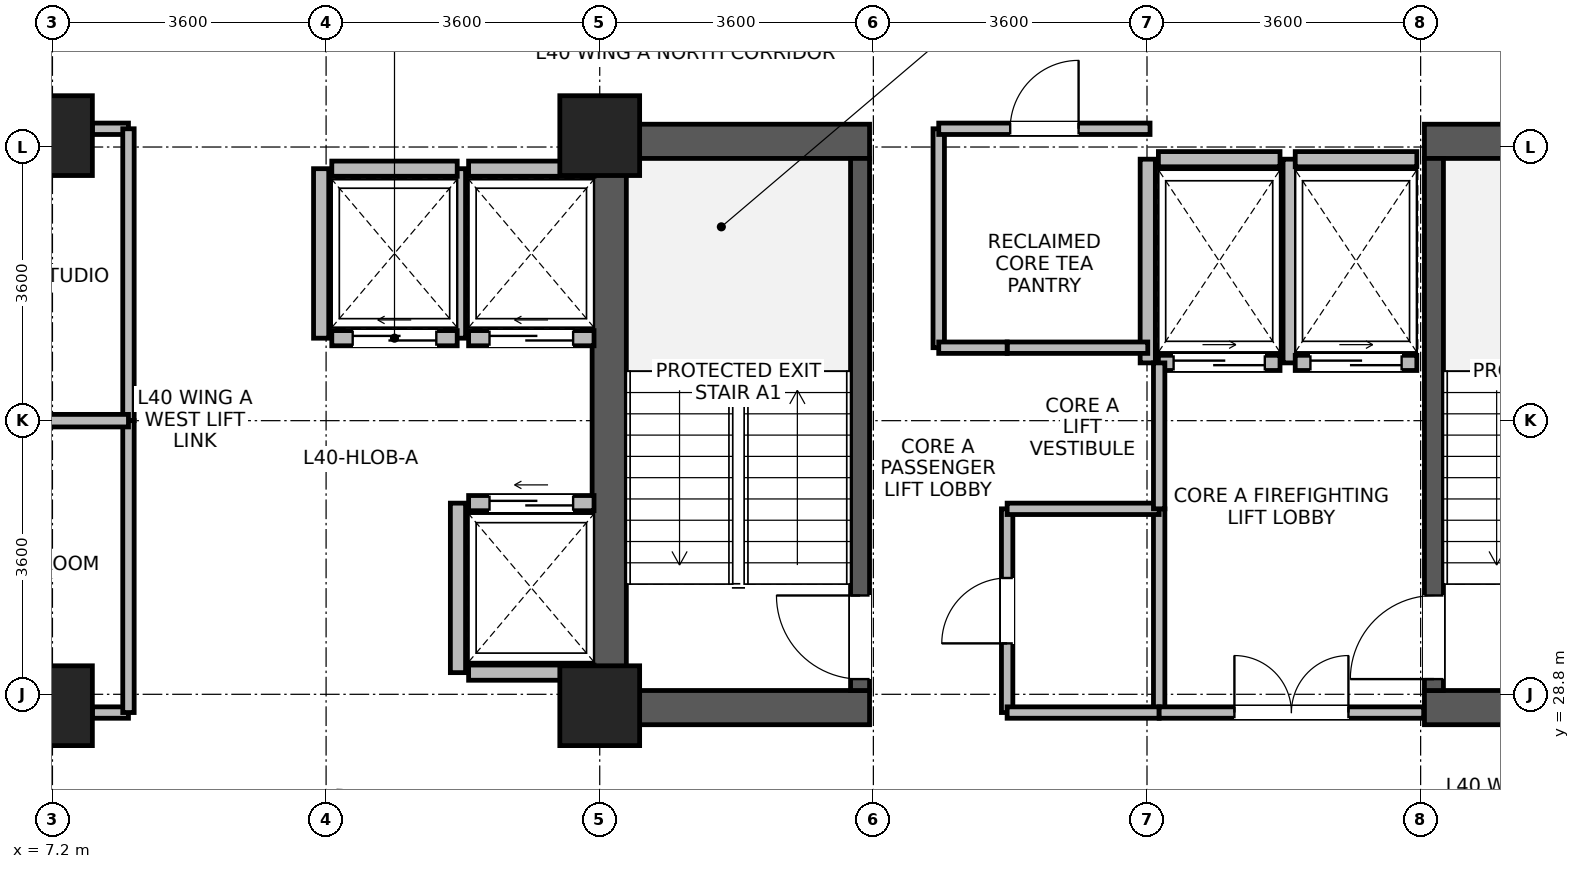
"""IFC4 building model, lengths in metres.
Left out: names, types, materials, properties, quantities, classifications, styles, units other than length and angle.
Written with IfcOpenShell. Run it as: python <this file> out.ifc"""

import sys

from ifc_helpers import new_model, si_unit, direction, frame, frame_2d, origin, origin_2d, place, context, subcontext, project, spatial, rectangle, extrude, source, transform, mapped, element, fill, save


model = new_model("IFC4")
c1 = context("Model", 3, precision=1e-05, world=origin(), true_north=direction((0.0, 1.0)))
c2 = subcontext(c1, "Body", "Model", "MODEL_VIEW")
j1 = project(units=[si_unit("LENGTHUNIT", "METRE"), si_unit("PLANEANGLEUNIT", "RADIAN")], contexts=[c1])
p1 = place(None, origin())
s1 = spatial("IfcSite", under=j1, at=p1, CompositionType="ELEMENT")
p2 = place(p1, origin())
s2 = spatial("IfcBuilding", under=s1, at=p2, CompositionType="ELEMENT")
p3 = place(p2, frame((0.0, 0.0, 158.7)))
s3 = spatial("IfcBuildingStorey", under=s2, at=p3, CompositionType="ELEMENT", Elevation=158.7)
p4 = place(p3, frame((14.525, 28.4, 0.0), z_axis=(0.0, 0.0, 1.0), x_axis=(0.0, 1.0, 0.0)))
e1 = element("IfcWall", 1, at=p4, inside=s3, PredefinedType="SHEAR", context=c2, shape_type="SweptSolid", body=[
    extrude(rectangle(XDim=7.9, YDim=0.45, at=frame_2d((3.95, 0.0))), origin(), (0.0, 0.0, 1.0), 3.46),
])
for number, where, z_axis, x_axis in (
    (2, (14.75, 28.625, 0.0), (0.0, 0.0, 1.0), (1.0, 0.0, 0.0)),
    (3, (25.25, 28.625, 0.0), (0.0, 0.0, 1.0), (1.0, 0.0, 0.0)),
    (4, (14.75, 36.075, 0.0), (0.0, 0.0, 1.0), (1.0, 0.0, 0.0)),
    (5, (25.25, 36.075, 0.0), (0.0, 0.0, 1.0), (1.0, 0.0, 0.0)),
):
    element("IfcWall", number, at=place(p3, frame(where, z_axis=z_axis, x_axis=x_axis)), inside=s3, PredefinedType="SHEAR", context=c2, shape_type="SweptSolid", body=[
        extrude(rectangle(XDim=3.2, YDim=0.45, at=frame_2d((1.6, 0.0))), origin(), (0.0, 0.0, 1.0), 3.46),
    ])
p5 = place(p3, frame((17.825, 28.85, 0.0), z_axis=(0.0, 0.0, 1.0), x_axis=(0.0, 1.0, 0.0)))
e6 = element("IfcWall", 6, at=p5, inside=s3, PredefinedType="SHEAR", context=c2, shape_type="SweptSolid", body=[
    extrude(rectangle(XDim=7.0, YDim=0.25, at=frame_2d((3.5, 0.0))), origin(), (0.0, 0.0, 1.0), 3.46),
])
p6 = place(p5, frame((0.15, 0.0, 0.0)))
e7 = element("IfcOpeningElement", 7, at=p6, cuts=e6, PredefinedType="OPENING", context=c2, shape_type="SweptSolid", body=[
    extrude(rectangle(XDim=1.1, YDim=2.08, at=frame_2d((0.55, 1.04))), frame((0.0, 0.135, 0.0), z_axis=(0.0, -1.0, 0.0), x_axis=(1.0, 0.0, 0.0)), (0.0, 0.0, 1.0), 0.27),
])
p7 = place(p3, frame((25.375, 28.85, 0.0), z_axis=(0.0, 0.0, 1.0), x_axis=(0.0, 1.0, 0.0)))
e8 = element("IfcWall", 8, at=p7, inside=s3, PredefinedType="SHEAR", context=c2, shape_type="SweptSolid", body=[
    extrude(rectangle(XDim=7.0, YDim=0.25, at=frame_2d((3.5, 0.0))), origin(), (0.0, 0.0, 1.0), 3.46),
])
p8 = place(p7, frame((0.15, 0.0, 0.0)))
e9 = element("IfcOpeningElement", 9, at=p8, cuts=e8, PredefinedType="OPENING", context=c2, shape_type="SweptSolid", body=[
    extrude(rectangle(XDim=1.1, YDim=2.08, at=frame_2d((0.55, 1.04))), frame((0.0, 0.135, 0.0), z_axis=(0.0, -1.0, 0.0), x_axis=(1.0, 0.0, 0.0)), (0.0, 0.0, 1.0), 0.27),
])
m1 = source(origin(), c2, "Body", "SweptSolid", [
    extrude(rectangle(XDim=1.05, YDim=1.05, at=origin_2d()), origin(), (0.0, 0.0, 1.0), 3.7),
])
for number, where, z_axis, x_axis in (
    (10, (7.2, 28.65, 0.0), (0.0, 0.0, 1.0), (1.0, 0.0, 0.0)),
    (11, (7.2, 36.15, 0.0), (0.0, 0.0, 1.0), (1.0, 0.0, 0.0)),
    (12, (14.4, 28.65, 0.0), (0.0, 0.0, 1.0), (1.0, 0.0, 0.0)),
    (13, (14.4, 36.15, 0.0), (0.0, 0.0, 1.0), (1.0, 0.0, 0.0)),
):
    element("IfcColumn", number, at=place(p3, frame(where, z_axis=z_axis, x_axis=x_axis)), inside=s3, PredefinedType="COLUMN", context=c2, shape_type="MappedRepresentation", body=[
        mapped(m1, transform((0.0, 0.0, 0.0), x_axis=(1.0, 0.0, 0.0), y_axis=(0.0, 1.0, 0.0), z_axis=(0.0, 0.0, 1.0), scale=1.0)),
    ])
p9 = place(p3, frame((12.675, 33.485, 0.0), z_axis=(0.0, 0.0, 1.0), x_axis=(1.0, 0.0, 0.0)))
e14 = element("IfcWall", 14, at=p9, inside=s3, PredefinedType="PARTITIONING", context=c2, shape_type="SweptSolid", body=[
    extrude(rectangle(XDim=1.65, YDim=0.2, at=frame_2d((0.825, 0.0))), origin(), (0.0, 0.0, 1.0), 3.44),
])
p10 = place(p9, frame((0.275, 0.0, 0.0)))
e15 = element("IfcOpeningElement", 15, at=p10, cuts=e14, PredefinedType="OPENING", context=c2, shape_type="SweptSolid", body=[
    extrude(rectangle(XDim=1.1, YDim=2.12, at=frame_2d((0.55, 1.06))), frame((0.0, 0.11, 0.0), z_axis=(0.0, -1.0, 0.0), x_axis=(1.0, 0.0, 0.0)), (0.0, 0.0, 1.0), 0.22),
])
p11 = place(p3, frame((12.675, 35.715, 0.0), z_axis=(0.0, 0.0, 1.0), x_axis=(1.0, 0.0, 0.0)))
e16 = element("IfcWall", 16, at=p11, inside=s3, PredefinedType="PARTITIONING", context=c2, shape_type="SweptSolid", body=[
    extrude(rectangle(XDim=1.65, YDim=0.2, at=frame_2d((0.825, 0.0))), origin(), (0.0, 0.0, 1.0), 3.44),
])
p12 = place(p3, frame((12.535, 33.485, 0.0), z_axis=(0.0, 0.0, 1.0), x_axis=(0.0, 1.0, 0.0)))
e17 = element("IfcWall", 17, at=p12, inside=s3, PredefinedType="PARTITIONING", context=c2, shape_type="SweptSolid", body=[
    extrude(rectangle(XDim=2.23, YDim=0.2, at=frame_2d((1.115, 0.0))), origin(), (0.0, 0.0, 1.0), 3.44),
])
p13 = place(p3, frame((12.675, 29.085, 0.0), z_axis=(0.0, 0.0, 1.0), x_axis=(1.0, 0.0, 0.0)))
e18 = element("IfcWall", 18, at=p13, inside=s3, PredefinedType="PARTITIONING", context=c2, shape_type="SweptSolid", body=[
    extrude(rectangle(XDim=1.65, YDim=0.2, at=frame_2d((0.825, 0.0))), origin(), (0.0, 0.0, 1.0), 3.44),
])
p14 = place(p3, frame((12.675, 31.315, 0.0), z_axis=(0.0, 0.0, 1.0), x_axis=(1.0, 0.0, 0.0)))
e19 = element("IfcWall", 19, at=p14, inside=s3, PredefinedType="PARTITIONING", context=c2, shape_type="SweptSolid", body=[
    extrude(rectangle(XDim=1.65, YDim=0.2, at=frame_2d((0.825, 0.0))), origin(), (0.0, 0.0, 1.0), 3.44),
])
p15 = place(p14, frame((0.275, 0.0, 0.0)))
e20 = element("IfcOpeningElement", 20, at=p15, cuts=e19, PredefinedType="OPENING", context=c2, shape_type="SweptSolid", body=[
    extrude(rectangle(XDim=1.1, YDim=2.12, at=frame_2d((0.55, 1.06))), frame((0.0, 0.11, 0.0), z_axis=(0.0, -1.0, 0.0), x_axis=(1.0, 0.0, 0.0)), (0.0, 0.0, 1.0), 0.22),
])
p16 = place(p3, frame((12.535, 29.085, 0.0), z_axis=(0.0, 0.0, 1.0), x_axis=(0.0, 1.0, 0.0)))
e21 = element("IfcWall", 21, at=p16, inside=s3, PredefinedType="PARTITIONING", context=c2, shape_type="SweptSolid", body=[
    extrude(rectangle(XDim=2.23, YDim=0.2, at=frame_2d((1.115, 0.0))), origin(), (0.0, 0.0, 1.0), 3.44),
])
p17 = place(p3, frame((10.875, 33.485, 0.0), z_axis=(0.0, 0.0, 1.0), x_axis=(1.0, 0.0, 0.0)))
e22 = element("IfcWall", 22, at=p17, inside=s3, PredefinedType="PARTITIONING", context=c2, shape_type="SweptSolid", body=[
    extrude(rectangle(XDim=1.65, YDim=0.2, at=frame_2d((0.825, 0.0))), origin(), (0.0, 0.0, 1.0), 3.44),
])
p18 = place(p17, frame((0.275, 0.0, 0.0)))
e23 = element("IfcOpeningElement", 23, at=p18, cuts=e22, PredefinedType="OPENING", context=c2, shape_type="SweptSolid", body=[
    extrude(rectangle(XDim=1.1, YDim=2.12, at=frame_2d((0.55, 1.06))), frame((0.0, 0.11, 0.0), z_axis=(0.0, -1.0, 0.0), x_axis=(1.0, 0.0, 0.0)), (0.0, 0.0, 1.0), 0.22),
])
p19 = place(p3, frame((10.875, 35.715, 0.0), z_axis=(0.0, 0.0, 1.0), x_axis=(1.0, 0.0, 0.0)))
e24 = element("IfcWall", 24, at=p19, inside=s3, PredefinedType="PARTITIONING", context=c2, shape_type="SweptSolid", body=[
    extrude(rectangle(XDim=1.65, YDim=0.2, at=frame_2d((0.825, 0.0))), origin(), (0.0, 0.0, 1.0), 3.44),
])
p20 = place(p3, frame((10.735, 33.485, 0.0), z_axis=(0.0, 0.0, 1.0), x_axis=(0.0, 1.0, 0.0)))
e25 = element("IfcWall", 25, at=p20, inside=s3, PredefinedType="PARTITIONING", context=c2, shape_type="SweptSolid", body=[
    extrude(rectangle(XDim=2.23, YDim=0.2, at=frame_2d((1.115, 0.0))), origin(), (0.0, 0.0, 1.0), 3.44),
])
p21 = place(p3, frame((21.75, 33.16, 0.0), z_axis=(0.0, 0.0, 1.0), x_axis=(1.0, 0.0, 0.0)))
e26 = element("IfcWall", 26, at=p21, inside=s3, PredefinedType="PARTITIONING", context=c2, shape_type="SweptSolid", body=[
    extrude(rectangle(XDim=1.6, YDim=0.2, at=frame_2d((0.8, 0.0))), origin(), (0.0, 0.0, 1.0), 3.44),
])
p22 = place(p21, frame((0.2, 0.0, 0.0)))
e27 = element("IfcOpeningElement", 27, at=p22, cuts=e26, PredefinedType="OPENING", context=c2, shape_type="SweptSolid", body=[
    extrude(rectangle(XDim=1.2, YDim=2.12, at=frame_2d((0.6, 1.06))), frame((0.0, 0.11, 0.0), z_axis=(0.0, -1.0, 0.0), x_axis=(1.0, 0.0, 0.0)), (0.0, 0.0, 1.0), 0.22),
])
p23 = place(p3, frame((21.75, 35.84, 0.0), z_axis=(0.0, 0.0, 1.0), x_axis=(1.0, 0.0, 0.0)))
e28 = element("IfcWall", 28, at=p23, inside=s3, PredefinedType="PARTITIONING", context=c2, shape_type="SweptSolid", body=[
    extrude(rectangle(XDim=1.6, YDim=0.2, at=frame_2d((0.8, 0.0))), origin(), (0.0, 0.0, 1.0), 2.44),
])
for number, where, z_axis, x_axis in (
    (29, (21.61, 33.16, 0.0), (0.0, 0.0, 1.0), (0.0, 1.0, 0.0)),
    (30, (23.49, 33.16, 0.0), (0.0, 0.0, 1.0), (0.0, 1.0, 0.0)),
):
    element("IfcWall", number, at=place(p3, frame(where, z_axis=z_axis, x_axis=x_axis)), inside=s3, PredefinedType="PARTITIONING", context=c2, shape_type="SweptSolid", body=[
        extrude(rectangle(XDim=2.68, YDim=0.2, at=frame_2d((1.34, 0.0))), origin(), (0.0, 0.0, 1.0), 3.44),
    ])
p24 = place(p3, frame((23.55, 33.16, 0.0), z_axis=(0.0, 0.0, 1.0), x_axis=(1.0, 0.0, 0.0)))
e31 = element("IfcWall", 31, at=p24, inside=s3, PredefinedType="PARTITIONING", context=c2, shape_type="SweptSolid", body=[
    extrude(rectangle(XDim=1.6, YDim=0.2, at=frame_2d((0.8, 0.0))), origin(), (0.0, 0.0, 1.0), 3.44),
])
p25 = place(p24, frame((0.2, 0.0, 0.0)))
e32 = element("IfcOpeningElement", 32, at=p25, cuts=e31, PredefinedType="OPENING", context=c2, shape_type="SweptSolid", body=[
    extrude(rectangle(XDim=1.2, YDim=2.12, at=frame_2d((0.6, 1.06))), frame((0.0, 0.11, 0.0), z_axis=(0.0, -1.0, 0.0), x_axis=(1.0, 0.0, 0.0)), (0.0, 0.0, 1.0), 0.22),
])
p26 = place(p3, frame((23.55, 35.84, 0.0), z_axis=(0.0, 0.0, 1.0), x_axis=(1.0, 0.0, 0.0)))
e33 = element("IfcWall", 33, at=p26, inside=s3, PredefinedType="PARTITIONING", context=c2, shape_type="SweptSolid", body=[
    extrude(rectangle(XDim=1.6, YDim=0.2, at=frame_2d((0.8, 0.0))), origin(), (0.0, 0.0, 1.0), 2.44),
])
for number, where, z_axis, x_axis in (
    (34, (7.725, 28.56, 0.0), (0.0, 0.0, 1.0), (1.0, 0.0, 0.0)),
    (35, (7.725, 36.24, 0.0), (0.0, 0.0, 1.0), (1.0, 0.0, 0.0)),
):
    element("IfcWall", number, at=place(p3, frame(where, z_axis=z_axis, x_axis=x_axis)), inside=s3, PredefinedType="PARTITIONING", context=c2, shape_type="SweptSolid", body=[
        extrude(rectangle(XDim=0.475, YDim=0.15, at=frame_2d((0.237, 0.0))), origin(), (0.0, 0.0, 1.0), 2.84),
    ])
p27 = place(p3, frame((8.2, 32.4, 0.0), z_axis=(0.0, 0.0, 1.0), x_axis=(0.0, 1.0, 0.0)))
e36 = element("IfcWall", 36, at=p27, inside=s3, PredefinedType="PARTITIONING", context=c2, shape_type="SweptSolid", body=[
    extrude(rectangle(XDim=3.84, YDim=0.15, at=frame_2d((1.92, 0.0))), origin(), (0.0, 0.0, 1.0), 3.44),
])
p28 = place(p3, frame((8.2, 28.56, 0.0), z_axis=(0.0, 0.0, 1.0), x_axis=(0.0, 1.0, 0.0)))
e37 = element("IfcWall", 37, at=p28, inside=s3, PredefinedType="PARTITIONING", context=c2, shape_type="SweptSolid", body=[
    extrude(rectangle(XDim=3.84, YDim=0.15, at=frame_2d((1.92, 0.0))), origin(), (0.0, 0.0, 1.0), 3.44),
])
p29 = place(p3, frame((18.86, 33.36, 0.0), z_axis=(0.0, 0.0, 1.0), x_axis=(0.0, 1.0, 0.0)))
e38 = element("IfcWall", 38, at=p29, inside=s3, PredefinedType="PARTITIONING", context=c2, shape_type="SweptSolid", body=[
    extrude(rectangle(XDim=2.88, YDim=0.15, at=frame_2d((1.44, 0.0))), origin(), (0.0, 0.0, 1.0), 3.44),
])
p30 = place(p3, frame((18.86, 36.24, 0.0), z_axis=(0.0, 0.0, 1.0), x_axis=(1.0, 0.0, 0.0)))
e39 = element("IfcWall", 39, at=p30, inside=s3, PredefinedType="PARTITIONING", context=c2, shape_type="SweptSolid", body=[
    extrude(rectangle(XDim=2.78, YDim=0.15, at=frame_2d((1.39, 0.0))), origin(), (0.0, 0.0, 1.0), 2.44),
])
p31 = place(p30, frame((0.94, 0.0, 0.0)))
e40 = element("IfcOpeningElement", 40, at=p31, cuts=e39, PredefinedType="OPENING", context=c2, shape_type="SweptSolid", body=[
    extrude(rectangle(XDim=0.9, YDim=2.08, at=frame_2d((0.45, 1.04))), frame((0.0, 0.085, 0.0), z_axis=(0.0, -1.0, 0.0), x_axis=(1.0, 0.0, 0.0)), (0.0, 0.0, 1.0), 0.17),
])
p32 = place(p3, frame((19.76, 28.56, 0.0), z_axis=(0.0, 0.0, 1.0), x_axis=(0.0, 1.0, 0.0)))
e41 = element("IfcWall", 41, at=p32, inside=s3, PredefinedType="PARTITIONING", context=c2, shape_type="SweptSolid", body=[
    extrude(rectangle(XDim=2.68, YDim=0.15, at=frame_2d((1.34, 0.0))), origin(), (0.0, 0.0, 1.0), 3.44),
])
p33 = place(p32, frame((0.91, 0.0, 0.0)))
e42 = element("IfcOpeningElement", 42, at=p33, cuts=e41, PredefinedType="OPENING", context=c2, shape_type="SweptSolid", body=[
    extrude(rectangle(XDim=0.86, YDim=2.02, at=frame_2d((0.43, 1.01))), frame((0.0, 0.085, 0.0), z_axis=(0.0, -1.0, 0.0), x_axis=(1.0, 0.0, 0.0)), (0.0, 0.0, 1.0), 0.17),
])
p34 = place(p3, frame((21.76, 28.56, 0.0), z_axis=(0.0, 0.0, 1.0), x_axis=(0.0, 1.0, 0.0)))
e43 = element("IfcWall", 43, at=p34, inside=s3, PredefinedType="PARTITIONING", context=c2, shape_type="SweptSolid", body=[
    extrude(rectangle(XDim=2.68, YDim=0.15, at=frame_2d((1.34, 0.0))), origin(), (0.0, 0.0, 1.0), 3.44),
])
p35 = place(p3, frame((19.76, 28.56, 0.0), z_axis=(0.0, 0.0, 1.0), x_axis=(1.0, 0.0, 0.0)))
e44 = element("IfcWall", 44, at=p35, inside=s3, PredefinedType="PARTITIONING", context=c2, shape_type="SweptSolid", body=[
    extrude(rectangle(XDim=2.0, YDim=0.15, at=frame_2d((1.0, 0.0))), origin(), (0.0, 0.0, 1.0), 2.44),
])
p36 = place(p3, frame((19.76, 31.24, 0.0), z_axis=(0.0, 0.0, 1.0), x_axis=(1.0, 0.0, 0.0)))
e45 = element("IfcWall", 45, at=p36, inside=s3, PredefinedType="PARTITIONING", context=c2, shape_type="SweptSolid", body=[
    extrude(rectangle(XDim=2.0, YDim=0.15, at=frame_2d((1.0, 0.0))), origin(), (0.0, 0.0, 1.0), 3.44),
])
p37 = place(p3, frame((19.76, 33.36, 0.0), z_axis=(0.0, 0.0, 1.0), x_axis=(1.0, 0.0, 0.0)))
e46 = element("IfcWall", 46, at=p37, inside=s3, PredefinedType="PARTITIONING", context=c2, shape_type="SweptSolid", body=[
    extrude(rectangle(XDim=1.85, YDim=0.15, at=frame_2d((0.925, 0.0))), origin(), (0.0, 0.0, 1.0), 3.44),
])
p38 = place(p3, frame((18.86, 33.36, 0.0), z_axis=(0.0, 0.0, 1.0), x_axis=(1.0, 0.0, 0.0)))
e47 = element("IfcWall", 47, at=p38, inside=s3, PredefinedType="PARTITIONING", context=c2, shape_type="SweptSolid", body=[
    extrude(rectangle(XDim=0.9, YDim=0.15, at=frame_2d((0.45, 0.0))), origin(), (0.0, 0.0, 1.0), 3.44),
])
p39 = place(p3, frame((0.632, 32.4, 0.0), z_axis=(0.0, 0.0, 1.0), x_axis=(1.0, 0.0, 0.0)))
e48 = element("IfcWall", 48, at=p39, inside=s3, PredefinedType="PARTITIONING", context=c2, shape_type="SweptSolid", body=[
    extrude(rectangle(XDim=7.568, YDim=0.165, at=frame_2d((3.784, 0.0))), origin(), (0.0, 0.0, 1.0), 3.44),
])
p40 = place(p3, frame((21.76, 28.56, 0.0), z_axis=(0.0, 0.0, 1.0), x_axis=(1.0, 0.0, 0.0)))
e49 = element("IfcWall", 49, at=p40, inside=s3, PredefinedType="PARTITIONING", context=c2, shape_type="SweptSolid", body=[
    extrude(rectangle(XDim=3.48, YDim=0.15, at=frame_2d((1.74, 0.0))), origin(), (0.0, 0.0, 1.0), 2.44),
])
p41 = place(p40, frame((0.99, 0.0, 0.0)))
e50 = element("IfcOpeningElement", 50, at=p41, cuts=e49, PredefinedType="OPENING", context=c2, shape_type="SweptSolid", body=[
    extrude(rectangle(XDim=1.5, YDim=2.1, at=frame_2d((0.75, 1.05))), frame((0.0, 0.085, 0.0), z_axis=(0.0, -1.0, 0.0), x_axis=(1.0, 0.0, 0.0)), (0.0, 0.0, 1.0), 0.17),
])
p42 = place(p3, frame((21.76, 31.24, 0.0), z_axis=(0.0, 0.0, 1.0), x_axis=(0.0, 1.0, 0.0)))
e51 = element("IfcWall", 51, at=p42, inside=s3, PredefinedType="PARTITIONING", context=c2, shape_type="SweptSolid", body=[
    extrude(rectangle(XDim=1.92, YDim=0.15, at=frame_2d((0.96, 0.0))), origin(), (0.0, 0.0, 1.0), 3.44),
])
p43 = place(p6, origin())
e52 = element("IfcDoor", 52, at=p43, inside=s3, OperationType="SINGLE_SWING_RIGHT", PredefinedType="DOOR", context=c2, shape_type="SweptSolid", body=[
    extrude(rectangle(XDim=1.1, YDim=2.08, at=frame_2d((0.55, 1.04))), frame((0.0, 0.025, 0.0), z_axis=(0.0, -1.0, 0.0), x_axis=(1.0, 0.0, 0.0)), (0.0, 0.0, 1.0), 0.05),
])
fill(e7, e52)
p44 = place(p8, origin())
e53 = element("IfcDoor", 53, at=p44, inside=s3, OperationType="SINGLE_SWING_LEFT", PredefinedType="DOOR", context=c2, shape_type="SweptSolid", body=[
    extrude(rectangle(XDim=1.1, YDim=2.08, at=frame_2d((0.55, 1.04))), frame((0.0, 0.025, 0.0), z_axis=(0.0, -1.0, 0.0), x_axis=(1.0, 0.0, 0.0)), (0.0, 0.0, 1.0), 0.05),
])
fill(e9, e53)
p45 = place(p10, origin())
e54 = element("IfcDoor", 54, at=p45, inside=s3, OperationType="SLIDING_TO_LEFT", PredefinedType="DOOR", context=c2, shape_type="SweptSolid", body=[
    extrude(rectangle(XDim=1.1, YDim=2.12, at=frame_2d((0.55, 1.06))), frame((0.0, 0.025, 0.0), z_axis=(0.0, -1.0, 0.0), x_axis=(1.0, 0.0, 0.0)), (0.0, 0.0, 1.0), 0.05),
])
fill(e15, e54)
p46 = place(p15, origin())
e55 = element("IfcDoor", 55, at=p46, inside=s3, OperationType="SLIDING_TO_LEFT", PredefinedType="DOOR", context=c2, shape_type="SweptSolid", body=[
    extrude(rectangle(XDim=1.1, YDim=2.12, at=frame_2d((0.55, 1.06))), frame((0.0, 0.025, 0.0), z_axis=(0.0, -1.0, 0.0), x_axis=(1.0, 0.0, 0.0)), (0.0, 0.0, 1.0), 0.05),
])
fill(e20, e55)
p47 = place(p18, origin())
e56 = element("IfcDoor", 56, at=p47, inside=s3, OperationType="SLIDING_TO_LEFT", PredefinedType="DOOR", context=c2, shape_type="SweptSolid", body=[
    extrude(rectangle(XDim=1.1, YDim=2.12, at=frame_2d((0.55, 1.06))), frame((0.0, 0.025, 0.0), z_axis=(0.0, -1.0, 0.0), x_axis=(1.0, 0.0, 0.0)), (0.0, 0.0, 1.0), 0.05),
])
fill(e23, e56)
p48 = place(p22, origin())
e57 = element("IfcDoor", 57, at=p48, inside=s3, OperationType="SLIDING_TO_RIGHT", PredefinedType="DOOR", context=c2, shape_type="SweptSolid", body=[
    extrude(rectangle(XDim=1.2, YDim=2.12, at=frame_2d((0.6, 1.06))), frame((0.0, 0.025, 0.0), z_axis=(0.0, -1.0, 0.0), x_axis=(1.0, 0.0, 0.0)), (0.0, 0.0, 1.0), 0.05),
])
fill(e27, e57)
p49 = place(p25, origin())
e58 = element("IfcDoor", 58, at=p49, inside=s3, OperationType="SLIDING_TO_RIGHT", PredefinedType="DOOR", context=c2, shape_type="SweptSolid", body=[
    extrude(rectangle(XDim=1.2, YDim=2.12, at=frame_2d((0.6, 1.06))), frame((0.0, 0.025, 0.0), z_axis=(0.0, -1.0, 0.0), x_axis=(1.0, 0.0, 0.0)), (0.0, 0.0, 1.0), 0.05),
])
fill(e32, e58)
p50 = place(p31, origin())
e59 = element("IfcDoor", 59, at=p50, inside=s3, OperationType="SINGLE_SWING_RIGHT", PredefinedType="DOOR", context=c2, shape_type="SweptSolid", body=[
    extrude(rectangle(XDim=0.9, YDim=2.08, at=frame_2d((0.45, 1.04))), frame((0.0, 0.025, 0.0), z_axis=(0.0, -1.0, 0.0), x_axis=(1.0, 0.0, 0.0)), (0.0, 0.0, 1.0), 0.05),
])
fill(e40, e59)
p51 = place(p33, origin())
e60 = element("IfcDoor", 60, at=p51, inside=s3, OperationType="SINGLE_SWING_LEFT", PredefinedType="DOOR", context=c2, shape_type="SweptSolid", body=[
    extrude(rectangle(XDim=0.86, YDim=2.02, at=frame_2d((0.43, 1.01))), frame((0.0, 0.025, 0.0), z_axis=(0.0, -1.0, 0.0), x_axis=(1.0, 0.0, 0.0)), (0.0, 0.0, 1.0), 0.05),
])
fill(e42, e60)
p52 = place(p41, origin())
e61 = element("IfcDoor", 61, at=p52, inside=s3, OperationType="DOUBLE_DOOR_SINGLE_SWING", PredefinedType="DOOR", context=c2, shape_type="SweptSolid", body=[
    extrude(rectangle(XDim=1.5, YDim=2.1, at=frame_2d((0.75, 1.05))), frame((0.0, 0.025, 0.0), z_axis=(0.0, -1.0, 0.0), x_axis=(1.0, 0.0, 0.0)), (0.0, 0.0, 1.0), 0.05),
])
fill(e50, e61)
save(model, sys.argv[1])
